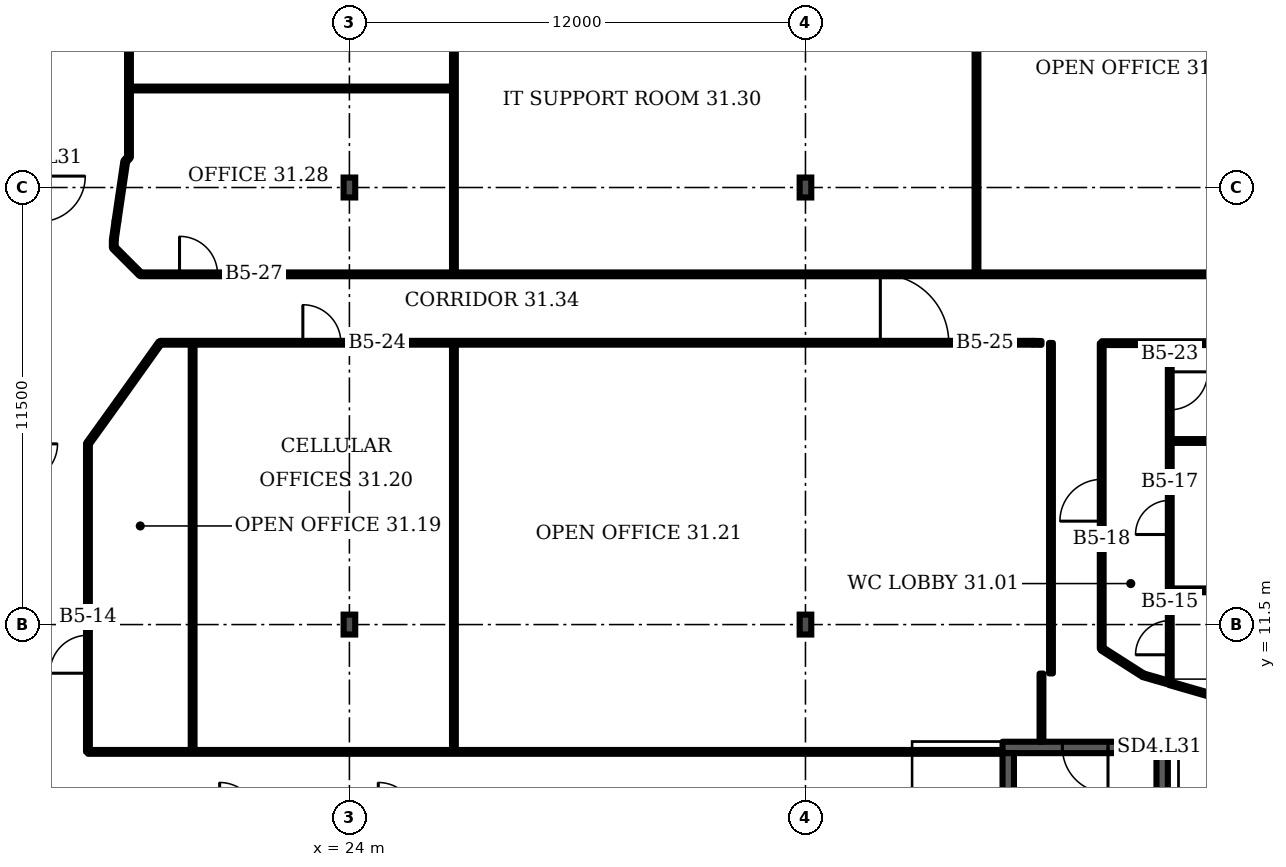
"""IFC4 building model, lengths in metres.
Left out: names, types, materials, properties, quantities, classifications, styles, units other than length and angle.
Written with IfcOpenShell. Run it as: python <this file> out.ifc"""

import sys

from ifc_helpers import new_model, si_unit, direction, frame, frame_2d, origin, origin_2d, place, context, subcontext, project, spatial, rectangle, i_section, extrude, element, fill, save


model = new_model("IFC4")
c1 = context("Model", 3, precision=1e-05, world=origin(), true_north=direction((0.0, 1.0)))
c2 = subcontext(c1, "Body", "Model", "MODEL_VIEW")
j1 = project(units=[si_unit("LENGTHUNIT", "METRE"), si_unit("PLANEANGLEUNIT", "RADIAN")], contexts=[c1])
p1 = place(None, origin())
s1 = spatial("IfcSite", under=j1, at=p1, CompositionType="ELEMENT")
p2 = place(p1, origin())
s2 = spatial("IfcBuilding", under=s1, at=p2, CompositionType="ELEMENT")
p3 = place(p2, frame((0.0, 0.0, 132.7)))
s3 = spatial("IfcBuildingStorey", under=s2, at=p3, CompositionType="ELEMENT", Elevation=132.7)
for number, where, z_axis, x_axis in (
    (1, (24.0, 11.5, 0.0), (0.0, 0.0, 1.0), (1.0, 0.0, 0.0)),
    (2, (36.0, 11.5, 0.0), (0.0, 0.0, 1.0), (1.0, 0.0, 0.0)),
    (3, (24.0, 23.0, 0.0), (0.0, 0.0, 1.0), (1.0, 0.0, 0.0)),
    (4, (36.0, 23.0, 0.0), (0.0, 0.0, 1.0), (1.0, 0.0, 0.0)),
):
    element("IfcColumn", number, at=place(p3, frame(where, z_axis=z_axis, x_axis=x_axis)), inside=s3, PredefinedType="COLUMN", context=c2, shape_type="SweptSolid", body=[
        extrude(i_section(OverallWidth=0.306, OverallDepth=0.524, WebThickness=0.021, FlangeThickness=0.04, FilletRadius=0.027, at=origin_2d()), origin(), (0.0, 0.0, 1.0), 3.6),
    ])
p4 = place(p3, frame((41.185, 8.267, 0.0), z_axis=(0.0, 0.0, 1.0), x_axis=(1.0, 0.0, 0.0)))
e5 = element("IfcWall", 5, at=p4, inside=s3, PredefinedType="SHEAR", context=c2, shape_type="SweptSolid", body=[
    extrude(rectangle(XDim=4.35, YDim=0.3, at=frame_2d((2.175, 0.0))), origin(), (0.0, 0.0, 1.0), 3.2),
])
p5 = place(p4, frame((1.575, 0.0, 0.0)))
e6 = element("IfcOpeningElement", 6, at=p5, cuts=e5, PredefinedType="OPENING", context=c2, shape_type="SweptSolid", body=[
    extrude(rectangle(XDim=1.2, YDim=2.1, at=frame_2d((0.6, 1.05))), frame((0.0, 0.16, 0.0), z_axis=(0.0, -1.0, 0.0), x_axis=(1.0, 0.0, 0.0)), (0.0, 0.0, 1.0), 0.32),
])
p6 = place(p3, frame((17.12, 8.15, 0.0), z_axis=(0.0, 0.0, 1.0), x_axis=(0.0, 1.0, 0.0)))
e7 = element("IfcWall", 7, at=p6, inside=s3, PredefinedType="PARTITIONING", context=c2, shape_type="SweptSolid", body=[
    extrude(rectangle(XDim=8.11, YDim=0.1, at=frame_2d((4.055, 0.0))), origin(), (0.0, 0.0, 1.0), 3.2),
])
p7 = place(p6, frame((2.07, 0.0, 0.0)))
e8 = element("IfcOpeningElement", 8, at=p7, cuts=e7, PredefinedType="OPENING", context=c2, shape_type="SweptSolid", body=[
    extrude(rectangle(XDim=1.0, YDim=2.1, at=frame_2d((0.5, 1.05))), frame((0.0, 0.06, 0.0), z_axis=(0.0, -1.0, 0.0), x_axis=(1.0, 0.0, 0.0)), (0.0, 0.0, 1.0), 0.12),
])
p8 = place(p3, frame((17.12, 8.15, 0.0), z_axis=(0.0, 0.0, 1.0), x_axis=(1.0, 0.0, 0.0)))
e9 = element("IfcWall", 9, at=p8, inside=s3, PredefinedType="PARTITIONING", context=c2, shape_type="SweptSolid", body=[
    extrude(rectangle(XDim=24.065, YDim=0.1, at=frame_2d((12.033, 0.0))), origin(), (0.0, 0.0, 1.0), 3.2),
])
p9 = place(p3, frame((17.12, 16.26, 0.0), z_axis=(0.0, 0.0, 1.0), x_axis=(0.583811, 0.811893, 0.0)))
e10 = element("IfcWall", 10, at=p9, inside=s3, PredefinedType="PARTITIONING", context=c2, shape_type="SweptSolid", body=[
    extrude(rectangle(XDim=1.364, YDim=0.1, at=frame_2d((0.682, 0.0))), origin(), (0.0, 0.0, 1.0), 3.2),
])
p10 = place(p3, frame((17.8, 21.42, 0.0), z_axis=(0.0, 0.0, 1.0), x_axis=(0.0, 1.0, 0.0)))
e11 = element("IfcWall", 11, at=p10, inside=s3, PredefinedType="PARTITIONING", context=c2, shape_type="SweptSolid", body=[
    extrude(rectangle(XDim=0.2, YDim=0.1, at=frame_2d((0.1, 0.0))), origin(), (0.0, 0.0, 1.0), 3.2),
])
p11 = place(p3, frame((17.8, 21.62, 0.0), z_axis=(0.0, 0.0, 1.0), x_axis=(0.141559, 0.989927, 0.0)))
e12 = element("IfcWall", 12, at=p11, inside=s3, PredefinedType="PARTITIONING", context=c2, shape_type="SweptSolid", body=[
    extrude(rectangle(XDim=0.495, YDim=0.1, at=frame_2d((0.248, 0.0))), origin(), (0.0, 0.0, 1.0), 3.2),
])
p12 = place(p3, frame((17.87, 22.11, 0.0), z_axis=(0.0, 0.0, 1.0), x_axis=(0.145396, 0.989372, 0.0)))
e13 = element("IfcWall", 13, at=p12, inside=s3, PredefinedType="PARTITIONING", context=c2, shape_type="SweptSolid", body=[
    extrude(rectangle(XDim=1.582, YDim=0.1, at=frame_2d((0.791, 0.0))), origin(), (0.0, 0.0, 1.0), 3.2),
])
p13 = place(p3, frame((17.915, 17.365, 0.0), z_axis=(0.0, 0.0, 1.0), x_axis=(0.580403, 0.814333, 0.0)))
e14 = element("IfcWall", 14, at=p13, inside=s3, PredefinedType="PARTITIONING", context=c2, shape_type="SweptSolid", body=[
    extrude(rectangle(XDim=1.905, YDim=0.1, at=frame_2d((0.952, 0.0))), origin(), (0.0, 0.0, 1.0), 3.2),
])
p14 = place(p3, frame((18.1, 23.685, 0.0), z_axis=(0.0, 0.0, 1.0), x_axis=(0.65566, 0.755051, 0.0)))
e15 = element("IfcWall", 15, at=p14, inside=s3, PredefinedType="PARTITIONING", context=c2, shape_type="SweptSolid", body=[
    extrude(rectangle(XDim=0.152, YDim=0.1, at=frame_2d((0.076, 0.0))), origin(), (0.0, 0.0, 1.0), 3.2),
])
p15 = place(p3, frame((18.2, 23.8, 0.0), z_axis=(0.0, 0.0, 1.0), x_axis=(0.0, 1.0, 0.0)))
e16 = element("IfcWall", 16, at=p15, inside=s3, PredefinedType="PARTITIONING", context=c2, shape_type="SweptSolid", body=[
    extrude(rectangle(XDim=6.7, YDim=0.1, at=frame_2d((3.35, 0.0))), origin(), (0.0, 0.0, 1.0), 3.2),
])
p16 = place(p3, frame((18.2, 25.605, 0.0), z_axis=(0.0, 0.0, 1.0), x_axis=(1.0, 0.0, 0.0)))
e17 = element("IfcWall", 17, at=p16, inside=s3, PredefinedType="PARTITIONING", context=c2, shape_type="SweptSolid", body=[
    extrude(rectangle(XDim=8.55, YDim=0.1, at=frame_2d((4.275, 0.0))), origin(), (0.0, 0.0, 1.0), 3.2),
])
p17 = place(p3, frame((18.505, 20.715, 0.0), z_axis=(0.0, 0.0, 1.0), x_axis=(-0.707107, 0.707107, 0.0)))
e18 = element("IfcWall", 18, at=p17, inside=s3, PredefinedType="PARTITIONING", context=c2, shape_type="SweptSolid", body=[
    extrude(rectangle(XDim=0.997, YDim=0.1, at=frame_2d((0.499, 0.0))), origin(), (0.0, 0.0, 1.0), 3.2),
])
p18 = place(p3, frame((18.505, 20.715, 0.0), z_axis=(0.0, 0.0, 1.0), x_axis=(1.0, 0.0, 0.0)))
e19 = element("IfcWall", 19, at=p18, inside=s3, PredefinedType="PARTITIONING", context=c2, shape_type="SweptSolid", body=[
    extrude(rectangle(XDim=49.385, YDim=0.1, at=frame_2d((24.692, 0.0))), origin(), (0.0, 0.0, 1.0), 3.2),
])
p19 = place(p18, frame((1.025, 0.0, 0.0)))
e20 = element("IfcOpeningElement", 20, at=p19, cuts=e19, PredefinedType="OPENING", context=c2, shape_type="SweptSolid", body=[
    extrude(rectangle(XDim=1.0, YDim=2.1, at=frame_2d((0.5, 1.05))), frame((0.0, 0.06, 0.0), z_axis=(0.0, -1.0, 0.0), x_axis=(1.0, 0.0, 0.0)), (0.0, 0.0, 1.0), 0.12),
])
p20 = place(p3, frame((19.02, 18.915, 0.0), z_axis=(0.0, 0.0, 1.0), x_axis=(1.0, 0.0, 0.0)))
e21 = element("IfcWall", 21, at=p20, inside=s3, PredefinedType="PARTITIONING", context=c2, shape_type="SweptSolid", body=[
    extrude(rectangle(XDim=22.965, YDim=0.1, at=frame_2d((11.482, 0.0))), origin(), (0.0, 0.0, 1.0), 3.2),
])
p21 = place(p20, frame((3.755, 0.0, 0.0)))
e22 = element("IfcOpeningElement", 22, at=p21, cuts=e21, PredefinedType="OPENING", context=c2, shape_type="SweptSolid", body=[
    extrude(rectangle(XDim=1.0, YDim=2.1, at=frame_2d((0.5, 1.05))), frame((0.0, 0.06, 0.0), z_axis=(0.0, -1.0, 0.0), x_axis=(1.0, 0.0, 0.0)), (0.0, 0.0, 1.0), 0.12),
])
p22 = place(p20, frame((18.95, 0.0, 0.0)))
e23 = element("IfcOpeningElement", 23, at=p22, cuts=e21, PredefinedType="OPENING", context=c2, shape_type="SweptSolid", body=[
    extrude(rectangle(XDim=1.8, YDim=2.1, at=frame_2d((0.9, 1.05))), frame((0.0, 0.06, 0.0), z_axis=(0.0, -1.0, 0.0), x_axis=(1.0, 0.0, 0.0)), (0.0, 0.0, 1.0), 0.12),
])
for number, where, z_axis, x_axis in (
    (24, (19.875, 8.15, 0.0), (0.0, 0.0, 1.0), (0.0, 1.0, 0.0)),
    (25, (26.75, 8.15, 0.0), (0.0, 0.0, 1.0), (0.0, 1.0, 0.0)),
):
    element("IfcWall", number, at=place(p3, frame(where, z_axis=z_axis, x_axis=x_axis)), inside=s3, PredefinedType="PARTITIONING", context=c2, shape_type="SweptSolid", body=[
        extrude(rectangle(XDim=10.765, YDim=0.1, at=frame_2d((5.383, 0.0))), origin(), (0.0, 0.0, 1.0), 3.2),
    ])
for number, where, z_axis, x_axis in (
    (26, (26.75, 20.715, 0.0), (0.0, 0.0, 1.0), (0.0, 1.0, 0.0)),
    (27, (40.5, 20.715, 0.0), (0.0, 0.0, 1.0), (0.0, 1.0, 0.0)),
):
    element("IfcWall", number, at=place(p3, frame(where, z_axis=z_axis, x_axis=x_axis)), inside=s3, PredefinedType="PARTITIONING", context=c2, shape_type="SweptSolid", body=[
        extrude(rectangle(XDim=9.785, YDim=0.1, at=frame_2d((4.893, 0.0))), origin(), (0.0, 0.0, 1.0), 3.2),
    ])
p23 = place(p3, frame((42.21, 8.417, 0.0), z_axis=(0.0, 0.0, 1.0), x_axis=(0.0, 1.0, 0.0)))
e28 = element("IfcWall", 28, at=p23, inside=s3, PredefinedType="PARTITIONING", context=c2, shape_type="SweptSolid", body=[
    extrude(rectangle(XDim=1.793, YDim=0.1, at=frame_2d((0.896, 0.0))), origin(), (0.0, 0.0, 1.0), 3.2),
])
p24 = place(p3, frame((42.21, 18.91, 0.0), z_axis=(0.0, 0.0, 1.0), x_axis=(-0.999736, 0.022795, 0.0)))
e29 = element("IfcWall", 29, at=p24, inside=s3, PredefinedType="PARTITIONING", context=c2, shape_type="SweptSolid", body=[
    extrude(rectangle(XDim=0.225, YDim=0.1, at=frame_2d((0.112, 0.0))), origin(), (0.0, 0.0, 1.0), 3.2),
])
p25 = place(p3, frame((42.46, 10.215, 0.0), z_axis=(0.0, 0.0, 1.0), x_axis=(0.0, 1.0, 0.0)))
e30 = element("IfcWall", 30, at=p25, inside=s3, PredefinedType="PARTITIONING", context=c2, shape_type="SweptSolid", body=[
    extrude(rectangle(XDim=8.695, YDim=0.1, at=frame_2d((4.347, 0.0))), origin(), (0.0, 0.0, 1.0), 3.2),
])
p26 = place(p3, frame((43.795, 10.865, 0.0), z_axis=(0.0, 0.0, 1.0), x_axis=(0.0, 1.0, 0.0)))
e31 = element("IfcWall", 31, at=p26, inside=s3, PredefinedType="PARTITIONING", context=c2, shape_type="SweptSolid", body=[
    extrude(rectangle(XDim=8.04, YDim=0.1, at=frame_2d((4.02, 0.0))), origin(), (0.0, 0.0, 1.0), 3.2),
])
p27 = place(p26, frame((3.356, 0.0, 0.0)))
e32 = element("IfcOpeningElement", 32, at=p27, cuts=e31, PredefinedType="OPENING", context=c2, shape_type="SweptSolid", body=[
    extrude(rectangle(XDim=1.1, YDim=2.1, at=frame_2d((0.55, 1.05))), frame((0.0, 0.06, 0.0), z_axis=(0.0, -1.0, 0.0), x_axis=(1.0, 0.0, 0.0)), (0.0, 0.0, 1.0), 0.12),
])
p28 = place(p3, frame((43.795, 18.905, 0.0), z_axis=(0.0, 0.0, 1.0), x_axis=(1.0, 0.0, 0.0)))
e33 = element("IfcWall", 33, at=p28, inside=s3, PredefinedType="PARTITIONING", context=c2, shape_type="SweptSolid", body=[
    extrude(rectangle(XDim=29.12, YDim=0.1, at=frame_2d((14.56, 0.0))), origin(), (0.0, 0.0, 1.0), 3.2),
])
p29 = place(p28, frame((16.475, 0.0, 0.0)))
e34 = element("IfcOpeningElement", 34, at=p29, cuts=e33, PredefinedType="OPENING", context=c2, shape_type="SweptSolid", body=[
    extrude(rectangle(XDim=1.8, YDim=2.1, at=frame_2d((0.9, 1.05))), frame((0.0, 0.06, 0.0), z_axis=(0.0, -1.0, 0.0), x_axis=(1.0, 0.0, 0.0)), (0.0, 0.0, 1.0), 0.12),
])
p30 = place(p3, frame((44.89, 10.165, 0.0), z_axis=(0.0, 0.0, 1.0), x_axis=(-0.842559, 0.538599, 0.0)))
e35 = element("IfcWall", 35, at=p30, inside=s3, PredefinedType="PARTITIONING", context=c2, shape_type="SweptSolid", body=[
    extrude(rectangle(XDim=1.3, YDim=0.1, at=frame_2d((0.65, 0.0))), origin(), (0.0, 0.0, 1.0), 3.2),
])
p31 = place(p3, frame((45.585, 9.965, 0.0), z_axis=(0.0, 0.0, 1.0), x_axis=(0.0, 1.0, 0.0)))
e36 = element("IfcWall", 36, at=p31, inside=s3, PredefinedType="PARTITIONING", context=c2, shape_type="SweptSolid", body=[
    extrude(rectangle(XDim=8.94, YDim=0.1, at=frame_2d((4.47, 0.0))), origin(), (0.0, 0.0, 1.0), 3.2),
])
p32 = place(p31, frame((0.74, 0.0, 0.0)))
e37 = element("IfcOpeningElement", 37, at=p32, cuts=e36, PredefinedType="OPENING", context=c2, shape_type="SweptSolid", body=[
    extrude(rectangle(XDim=0.9, YDim=2.1, at=frame_2d((0.45, 1.05))), frame((0.0, 0.06, 0.0), z_axis=(0.0, -1.0, 0.0), x_axis=(1.0, 0.0, 0.0)), (0.0, 0.0, 1.0), 0.12),
])
p33 = place(p31, frame((3.905, 0.0, 0.0)))
e38 = element("IfcOpeningElement", 38, at=p33, cuts=e36, PredefinedType="OPENING", context=c2, shape_type="SweptSolid", body=[
    extrude(rectangle(XDim=0.9, YDim=2.1, at=frame_2d((0.45, 1.05))), frame((0.0, 0.06, 0.0), z_axis=(0.0, -1.0, 0.0), x_axis=(1.0, 0.0, 0.0)), (0.0, 0.0, 1.0), 0.12),
])
p34 = place(p31, frame((7.185, 0.0, 0.0)))
e39 = element("IfcOpeningElement", 39, at=p34, cuts=e36, PredefinedType="OPENING", context=c2, shape_type="SweptSolid", body=[
    extrude(rectangle(XDim=1.0, YDim=2.1, at=frame_2d((0.5, 1.05))), frame((0.0, 0.06, 0.0), z_axis=(0.0, -1.0, 0.0), x_axis=(1.0, 0.0, 0.0)), (0.0, 0.0, 1.0), 0.12),
])
for number, where, z_axis, x_axis in (
    (40, (45.585, 12.4, 0.0), (0.0, 0.0, 1.0), (1.0, 0.0, 0.0)),
    (41, (45.585, 16.33, 0.0), (0.0, 0.0, 1.0), (1.0, 0.0, 0.0)),
):
    element("IfcWall", number, at=place(p3, frame(where, z_axis=z_axis, x_axis=x_axis)), inside=s3, PredefinedType="PARTITIONING", context=c2, shape_type="SweptSolid", body=[
        extrude(rectangle(XDim=8.665, YDim=0.1, at=frame_2d((4.333, 0.0))), origin(), (0.0, 0.0, 1.0), 3.2),
    ])
p35 = place(p3, frame((45.585, 9.965, 0.0), z_axis=(0.0, 0.0, 1.0), x_axis=(-0.961024, 0.276459, 0.0)))
e42 = element("IfcWall", 42, at=p35, inside=s3, PredefinedType="PARTITIONING", context=c2, shape_type="SweptSolid", body=[
    extrude(rectangle(XDim=0.723, YDim=0.1, at=frame_2d((0.362, 0.0))), origin(), (0.0, 0.0, 1.0), 3.2),
])
p36 = place(p3, frame((46.9, 9.575, 0.0), z_axis=(0.0, 0.0, 1.0), x_axis=(-0.960666, 0.277712, 0.0)))
e43 = element("IfcWall", 43, at=p36, inside=s3, PredefinedType="PARTITIONING", context=c2, shape_type="SweptSolid", body=[
    extrude(rectangle(XDim=1.369, YDim=0.1, at=frame_2d((0.685, 0.0))), origin(), (0.0, 0.0, 1.0), 3.2),
])
for number, where, z_axis, x_axis in (
    (44, (41.335, 0.617, 0.0), (0.0, 0.0, 1.0), (0.0, 1.0, 0.0)),
    (45, (45.385, 0.617, 0.0), (0.0, 0.0, 1.0), (0.0, 1.0, 0.0)),
):
    element("IfcWall", number, at=place(p3, frame(where, z_axis=z_axis, x_axis=x_axis)), inside=s3, PredefinedType="SHEAR", context=c2, shape_type="SweptSolid", body=[
        extrude(rectangle(XDim=7.5, YDim=0.3, at=frame_2d((3.75, 0.0))), origin(), (0.0, 0.0, 1.0), 3.2),
    ])
p37 = place(p5, origin())
e46 = element("IfcDoor", 46, at=p37, inside=s3, OperationType="SINGLE_SWING_RIGHT", PredefinedType="DOOR", context=c2, shape_type="SweptSolid", body=[
    extrude(rectangle(XDim=1.2, YDim=2.1, at=frame_2d((0.6, 1.05))), frame((0.0, 0.025, 0.0), z_axis=(0.0, -1.0, 0.0), x_axis=(1.0, 0.0, 0.0)), (0.0, 0.0, 1.0), 0.05),
])
fill(e6, e46)
p38 = place(p7, origin())
e47 = element("IfcDoor", 47, at=p38, inside=s3, OperationType="SINGLE_SWING_LEFT", PredefinedType="DOOR", context=c2, shape_type="SweptSolid", body=[
    extrude(rectangle(XDim=1.0, YDim=2.1, at=frame_2d((0.5, 1.05))), frame((0.0, 0.025, 0.0), z_axis=(0.0, -1.0, 0.0), x_axis=(1.0, 0.0, 0.0)), (0.0, 0.0, 1.0), 0.05),
])
fill(e8, e47)
p39 = place(p32, origin())
e48 = element("IfcDoor", 48, at=p39, inside=s3, OperationType="SINGLE_SWING_LEFT", PredefinedType="DOOR", context=c2, shape_type="SweptSolid", body=[
    extrude(rectangle(XDim=0.9, YDim=2.1, at=frame_2d((0.45, 1.05))), frame((0.0, 0.025, 0.0), z_axis=(0.0, -1.0, 0.0), x_axis=(1.0, 0.0, 0.0)), (0.0, 0.0, 1.0), 0.05),
])
fill(e37, e48)
p40 = place(p33, origin())
e49 = element("IfcDoor", 49, at=p40, inside=s3, OperationType="SINGLE_SWING_LEFT", PredefinedType="DOOR", context=c2, shape_type="SweptSolid", body=[
    extrude(rectangle(XDim=0.9, YDim=2.1, at=frame_2d((0.45, 1.05))), frame((0.0, 0.025, 0.0), z_axis=(0.0, -1.0, 0.0), x_axis=(1.0, 0.0, 0.0)), (0.0, 0.0, 1.0), 0.05),
])
fill(e38, e49)
p41 = place(p27, origin())
e50 = element("IfcDoor", 50, at=p41, inside=s3, OperationType="SINGLE_SWING_LEFT", PredefinedType="DOOR", context=c2, shape_type="SweptSolid", body=[
    extrude(rectangle(XDim=1.1, YDim=2.1, at=frame_2d((0.55, 1.05))), frame((0.0, 0.025, 0.0), z_axis=(0.0, -1.0, 0.0), x_axis=(1.0, 0.0, 0.0)), (0.0, 0.0, 1.0), 0.05),
])
fill(e32, e50)
p42 = place(p34, origin())
e51 = element("IfcDoor", 51, at=p42, inside=s3, OperationType="SINGLE_SWING_RIGHT", PredefinedType="DOOR", context=c2, shape_type="SweptSolid", body=[
    extrude(rectangle(XDim=1.0, YDim=2.1, at=frame_2d((0.5, 1.05))), frame((0.0, 0.025, 0.0), z_axis=(0.0, -1.0, 0.0), x_axis=(1.0, 0.0, 0.0)), (0.0, 0.0, 1.0), 0.05),
])
fill(e39, e51)
p43 = place(p21, origin())
e52 = element("IfcDoor", 52, at=p43, inside=s3, OperationType="SINGLE_SWING_LEFT", PredefinedType="DOOR", context=c2, shape_type="SweptSolid", body=[
    extrude(rectangle(XDim=1.0, YDim=2.1, at=frame_2d((0.5, 1.05))), frame((0.0, 0.025, 0.0), z_axis=(0.0, -1.0, 0.0), x_axis=(1.0, 0.0, 0.0)), (0.0, 0.0, 1.0), 0.05),
])
fill(e22, e52)
p44 = place(p22, origin())
e53 = element("IfcDoor", 53, at=p44, inside=s3, OperationType="DOUBLE_DOOR_SINGLE_SWING", PredefinedType="DOOR", context=c2, shape_type="SweptSolid", body=[
    extrude(rectangle(XDim=1.8, YDim=2.1, at=frame_2d((0.9, 1.05))), frame((0.0, 0.025, 0.0), z_axis=(0.0, -1.0, 0.0), x_axis=(1.0, 0.0, 0.0)), (0.0, 0.0, 1.0), 0.05),
])
fill(e23, e53)
p45 = place(p19, origin())
e54 = element("IfcDoor", 54, at=p45, inside=s3, OperationType="SINGLE_SWING_LEFT", PredefinedType="DOOR", context=c2, shape_type="SweptSolid", body=[
    extrude(rectangle(XDim=1.0, YDim=2.1, at=frame_2d((0.5, 1.05))), frame((0.0, 0.025, 0.0), z_axis=(0.0, -1.0, 0.0), x_axis=(1.0, 0.0, 0.0)), (0.0, 0.0, 1.0), 0.05),
])
fill(e20, e54)
save(model, sys.argv[1])
